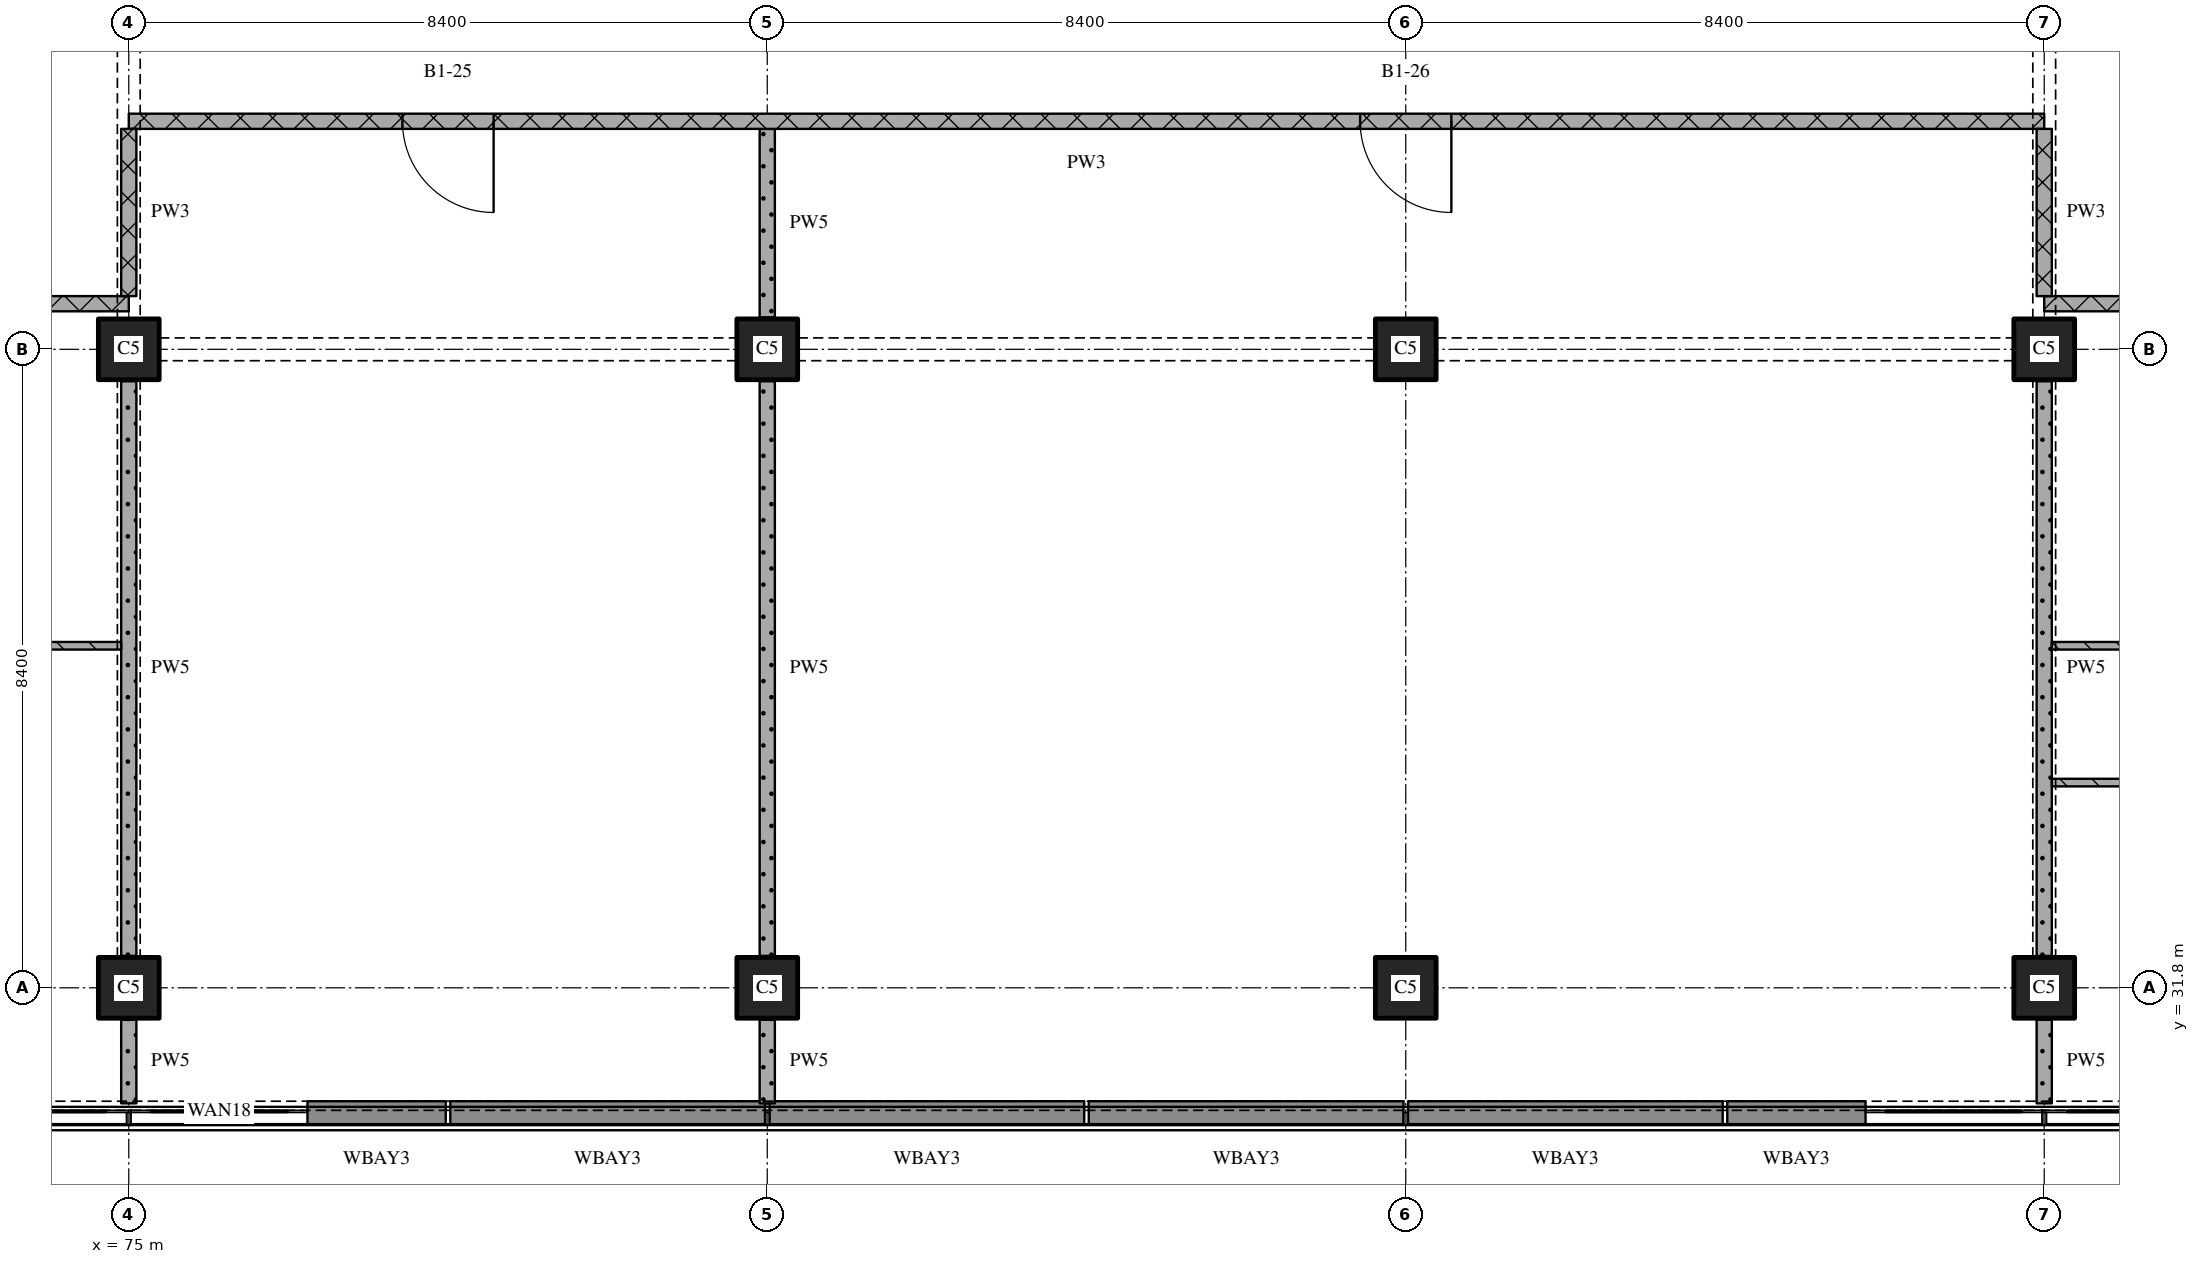
"""IFC4 building model, lengths in metres.
Left out: names, types, materials, properties, quantities, classifications, styles, units other than length and angle.
Written with IfcOpenShell. Run it as: python <this file> out.ifc"""

import sys

from ifc_helpers import new_model, si_unit, direction, frame, frame_2d, origin, origin_2d, place, context, subcontext, project, spatial, rectangle, extrude, element, fill, save


model = new_model("IFC4")
c1 = context("Model", 3, precision=1e-05, world=origin(), true_north=direction((0.0, 1.0)))
c2 = subcontext(c1, "Body", "Model", "MODEL_VIEW")
j1 = project(units=[si_unit("LENGTHUNIT", "METRE"), si_unit("PLANEANGLEUNIT", "RADIAN")], contexts=[c1])
p1 = place(None, origin())
s1 = spatial("IfcSite", under=j1, at=p1, CompositionType="ELEMENT")
p2 = place(p1, origin())
s2 = spatial("IfcBuilding", under=s1, at=p2, CompositionType="ELEMENT")
p3 = place(p2, frame((0.0, 0.0, 95.25)))
s3 = spatial("IfcBuildingStorey", under=s2, at=p3, CompositionType="ELEMENT", Elevation=95.25)
for number, where, z_axis, x_axis in (
    (1, (75.0, 31.8, 0.0), (0.0, 0.0, 1.0), (1.0, 0.0, 0.0)),
    (2, (75.0, 40.2, 0.0), (0.0, 0.0, 1.0), (1.0, 0.0, 0.0)),
    (3, (83.4, 31.8, 0.0), (0.0, 0.0, 1.0), (1.0, 0.0, 0.0)),
    (4, (83.4, 40.2, 0.0), (0.0, 0.0, 1.0), (1.0, 0.0, 0.0)),
    (5, (91.8, 31.8, 0.0), (0.0, 0.0, 1.0), (1.0, 0.0, 0.0)),
    (6, (91.8, 40.2, 0.0), (0.0, 0.0, 1.0), (1.0, 0.0, 0.0)),
    (7, (100.2, 31.8, 0.0), (0.0, 0.0, 1.0), (1.0, 0.0, 0.0)),
    (8, (100.2, 40.2, 0.0), (0.0, 0.0, 1.0), (1.0, 0.0, 0.0)),
):
    element("IfcColumn", number, at=place(p3, frame(where, z_axis=z_axis, x_axis=x_axis)), inside=s3, PredefinedType="COLUMN", context=c2, shape_type="SweptSolid", body=[
        extrude(rectangle(XDim=0.8, YDim=0.8, at=origin_2d()), origin(), (0.0, 0.0, 1.0), 3.6),
    ])
p4 = place(p3, frame((79.17, 30.154, 0.0), z_axis=(0.0, 0.0, 1.0), x_axis=(-1.0, 0.0, 0.0)))
e9 = element("IfcWall", 9, at=p4, inside=s3, PredefinedType="SOLIDWALL", context=c2, shape_type="SweptSolid", body=[
    extrude(rectangle(XDim=1.819, YDim=0.308, at=frame_2d((0.91, 0.0))), origin(), (0.0, 0.0, 1.0), 3.2),
])
for number, where, z_axis, x_axis in (
    (10, (83.37, 30.154, 0.0), (0.0, 0.0, 1.0), (-1.0, 0.0, 0.0)),
    (11, (87.57, 30.154, 0.0), (0.0, 0.0, 1.0), (-1.0, 0.0, 0.0)),
    (12, (91.77, 30.154, 0.0), (0.0, 0.0, 1.0), (-1.0, 0.0, 0.0)),
):
    element("IfcWall", number, at=place(p3, frame(where, z_axis=z_axis, x_axis=x_axis)), inside=s3, PredefinedType="SOLIDWALL", context=c2, shape_type="SweptSolid", body=[
        extrude(rectangle(XDim=4.14, YDim=0.308, at=frame_2d((2.07, 0.0))), origin(), (0.0, 0.0, 1.0), 3.2),
    ])
p5 = place(p3, frame((95.97, 30.154, 0.0), z_axis=(0.0, 0.0, 1.0), x_axis=(-1.0, 0.0, 0.0)))
e13 = element("IfcWall", 13, at=p5, inside=s3, PredefinedType="SOLIDWALL", context=c2, shape_type="SweptSolid", body=[
    extrude(rectangle(XDim=4.14, YDim=0.308, at=frame_2d((2.07, 0.0))), origin(), (0.0, 0.0, 1.0), 3.2),
])
p6 = place(p3, frame((97.849, 30.154, 0.0), z_axis=(0.0, 0.0, 1.0), x_axis=(-1.0, 0.0, 0.0)))
e14 = element("IfcWall", 14, at=p6, inside=s3, PredefinedType="SOLIDWALL", context=c2, shape_type="SweptSolid", body=[
    extrude(rectangle(XDim=1.819, YDim=0.308, at=frame_2d((0.91, 0.0))), origin(), (0.0, 0.0, 1.0), 3.2),
])
p7 = place(p3, frame((117.0, 34.5, 0.0), z_axis=(0.0, 0.0, 1.0), x_axis=(-1.0, 0.0, 0.0)))
e15 = element("IfcWall", 15, at=p7, inside=s3, PredefinedType="PARTITIONING", context=c2, shape_type="SweptSolid", body=[
    extrude(rectangle(XDim=16.7, YDim=0.1, at=frame_2d((8.35, 0.0))), origin(), (0.0, 0.0, 1.0), 3.32),
])
p8 = place(p7, frame((12.15, 0.0, 0.0)))
e16 = element("IfcOpeningElement", 16, at=p8, cuts=e15, PredefinedType="OPENING", context=c2, shape_type="SweptSolid", body=[
    extrude(rectangle(XDim=0.9, YDim=2.1, at=frame_2d((0.45, 1.05))), frame((0.0, 0.06, 0.0), z_axis=(0.0, -1.0, 0.0), x_axis=(1.0, 0.0, 0.0)), (0.0, 0.0, 1.0), 0.12),
])
p9 = place(p3, frame((65.7, 36.3, 0.0), z_axis=(0.0, 0.0, 1.0), x_axis=(1.0, 0.0, 0.0)))
e17 = element("IfcWall", 17, at=p9, inside=s3, PredefinedType="PARTITIONING", context=c2, shape_type="SweptSolid", body=[
    extrude(rectangle(XDim=9.2, YDim=0.1, at=frame_2d((4.6, 0.0))), origin(), (0.0, 0.0, 1.0), 3.32),
])
p10 = place(p9, frame((6.5, 0.0, 0.0)))
e18 = element("IfcOpeningElement", 18, at=p10, cuts=e17, PredefinedType="OPENING", context=c2, shape_type="SweptSolid", body=[
    extrude(rectangle(XDim=0.8, YDim=2.1, at=frame_2d((0.4, 1.05))), frame((0.0, 0.06, 0.0), z_axis=(0.0, -1.0, 0.0), x_axis=(1.0, 0.0, 0.0)), (0.0, 0.0, 1.0), 0.12),
])
p11 = place(p3, frame((100.3, 36.3, 0.0), z_axis=(0.0, 0.0, 1.0), x_axis=(1.0, 0.0, 0.0)))
e19 = element("IfcWall", 19, at=p11, inside=s3, PredefinedType="PARTITIONING", context=c2, shape_type="SweptSolid", body=[
    extrude(rectangle(XDim=9.2, YDim=0.1, at=frame_2d((4.6, 0.0))), origin(), (0.0, 0.0, 1.0), 3.32),
])
p12 = place(p11, frame((1.75, 0.0, 0.0)))
e20 = element("IfcOpeningElement", 20, at=p12, cuts=e19, PredefinedType="OPENING", context=c2, shape_type="SweptSolid", body=[
    extrude(rectangle(XDim=0.8, YDim=2.1, at=frame_2d((0.4, 1.05))), frame((0.0, 0.06, 0.0), z_axis=(0.0, -1.0, 0.0), x_axis=(1.0, 0.0, 0.0)), (0.0, 0.0, 1.0), 0.12),
])
p13 = place(p3, frame((75.0, 40.8, 0.0), z_axis=(0.0, 0.0, 1.0), x_axis=(-1.0, 0.0, 0.0)))
e21 = element("IfcWall", 21, at=p13, inside=s3, PredefinedType="PARTITIONING", context=c2, shape_type="SweptSolid", body=[
    extrude(rectangle(XDim=24.18, YDim=0.2, at=frame_2d((12.09, 0.0))), origin(), (0.0, 0.0, 1.0), 3.32),
])
p14 = place(p13, frame((9.55, 0.0, 0.0)))
e22 = element("IfcOpeningElement", 22, at=p14, cuts=e21, PredefinedType="OPENING", context=c2, shape_type="SweptSolid", body=[
    extrude(rectangle(XDim=1.0, YDim=2.1, at=frame_2d((0.5, 1.05))), frame((0.0, 0.11, 0.0), z_axis=(0.0, -1.0, 0.0), x_axis=(1.0, 0.0, 0.0)), (0.0, 0.0, 1.0), 0.22),
])
p15 = place(p3, frame((124.38, 40.8, 0.0), z_axis=(0.0, 0.0, 1.0), x_axis=(-1.0, 0.0, 0.0)))
e23 = element("IfcWall", 23, at=p15, inside=s3, PredefinedType="PARTITIONING", context=c2, shape_type="SweptSolid", body=[
    extrude(rectangle(XDim=24.18, YDim=0.2, at=frame_2d((12.09, 0.0))), origin(), (0.0, 0.0, 1.0), 3.32),
])
p16 = place(p15, frame((13.63, 0.0, 0.0)))
e24 = element("IfcOpeningElement", 24, at=p16, cuts=e23, PredefinedType="OPENING", context=c2, shape_type="SweptSolid", body=[
    extrude(rectangle(XDim=1.0, YDim=2.1, at=frame_2d((0.5, 1.05))), frame((0.0, 0.11, 0.0), z_axis=(0.0, -1.0, 0.0), x_axis=(1.0, 0.0, 0.0)), (0.0, 0.0, 1.0), 0.22),
])
p17 = place(p3, frame((100.2, 43.2, 0.0), z_axis=(0.0, 0.0, 1.0), x_axis=(-1.0, 0.0, 0.0)))
e25 = element("IfcWall", 25, at=p17, inside=s3, PredefinedType="PARTITIONING", context=c2, shape_type="SweptSolid", body=[
    extrude(rectangle(XDim=25.2, YDim=0.2, at=frame_2d((12.6, 0.0))), origin(), (0.0, 0.0, 1.0), 3.32),
])
p18 = place(p17, frame((7.8, 0.0, 0.0)))
e26 = element("IfcOpeningElement", 26, at=p18, cuts=e25, PredefinedType="OPENING", context=c2, shape_type="SweptSolid", body=[
    extrude(rectangle(XDim=1.2, YDim=2.1, at=frame_2d((0.6, 1.05))), frame((0.0, 0.11, 0.0), z_axis=(0.0, -1.0, 0.0), x_axis=(1.0, 0.0, 0.0)), (0.0, 0.0, 1.0), 0.22),
])
p19 = place(p17, frame((20.4, 0.0, 0.0)))
e27 = element("IfcOpeningElement", 27, at=p19, cuts=e25, PredefinedType="OPENING", context=c2, shape_type="SweptSolid", body=[
    extrude(rectangle(XDim=1.2, YDim=2.1, at=frame_2d((0.6, 1.05))), frame((0.0, 0.11, 0.0), z_axis=(0.0, -1.0, 0.0), x_axis=(1.0, 0.0, 0.0)), (0.0, 0.0, 1.0), 0.22),
])
p20 = place(p3, frame((75.0, 43.1, 0.0), z_axis=(0.0, 0.0, 1.0), x_axis=(0.0, -1.0, 0.0)))
e28 = element("IfcWall", 28, at=p20, inside=s3, PredefinedType="PARTITIONING", context=c2, shape_type="SweptSolid", body=[
    extrude(rectangle(XDim=2.2, YDim=0.2, at=frame_2d((1.1, 0.0))), origin(), (0.0, 0.0, 1.0), 2.43),
])
p21 = place(p3, frame((75.0, 31.38, 0.0), z_axis=(0.0, 0.0, 1.0), x_axis=(0.0, -1.0, 0.0)))
e29 = element("IfcWall", 29, at=p21, inside=s3, PredefinedType="PARTITIONING", context=c2, shape_type="SweptSolid", body=[
    extrude(rectangle(XDim=1.1, YDim=0.2, at=frame_2d((0.55, 0.0))), origin(), (0.0, 0.0, 1.0), 3.32),
])
p22 = place(p3, frame((75.0, 39.78, 0.0), z_axis=(0.0, 0.0, 1.0), x_axis=(0.0, -1.0, 0.0)))
e30 = element("IfcWall", 30, at=p22, inside=s3, PredefinedType="PARTITIONING", context=c2, shape_type="SweptSolid", body=[
    extrude(rectangle(XDim=7.56, YDim=0.2, at=frame_2d((3.78, 0.0))), origin(), (0.0, 0.0, 1.0), 2.83),
])
p23 = place(p3, frame((83.4, 31.38, 0.0), z_axis=(0.0, 0.0, 1.0), x_axis=(0.0, -1.0, 0.0)))
e31 = element("IfcWall", 31, at=p23, inside=s3, PredefinedType="PARTITIONING", context=c2, shape_type="SweptSolid", body=[
    extrude(rectangle(XDim=1.1, YDim=0.2, at=frame_2d((0.55, 0.0))), origin(), (0.0, 0.0, 1.0), 3.32),
])
p24 = place(p3, frame((83.4, 39.78, 0.0), z_axis=(0.0, 0.0, 1.0), x_axis=(0.0, -1.0, 0.0)))
e32 = element("IfcWall", 32, at=p24, inside=s3, PredefinedType="PARTITIONING", context=c2, shape_type="SweptSolid", body=[
    extrude(rectangle(XDim=7.56, YDim=0.2, at=frame_2d((3.78, 0.0))), origin(), (0.0, 0.0, 1.0), 3.32),
])
p25 = place(p3, frame((83.4, 43.1, 0.0), z_axis=(0.0, 0.0, 1.0), x_axis=(0.0, -1.0, 0.0)))
e33 = element("IfcWall", 33, at=p25, inside=s3, PredefinedType="PARTITIONING", context=c2, shape_type="SweptSolid", body=[
    extrude(rectangle(XDim=2.48, YDim=0.2, at=frame_2d((1.24, 0.0))), origin(), (0.0, 0.0, 1.0), 3.32),
])
p26 = place(p3, frame((100.2, 43.1, 0.0), z_axis=(0.0, 0.0, 1.0), x_axis=(0.0, -1.0, 0.0)))
e34 = element("IfcWall", 34, at=p26, inside=s3, PredefinedType="PARTITIONING", context=c2, shape_type="SweptSolid", body=[
    extrude(rectangle(XDim=2.2, YDim=0.2, at=frame_2d((1.1, 0.0))), origin(), (0.0, 0.0, 1.0), 2.43),
])
p27 = place(p3, frame((100.2, 31.38, 0.0), z_axis=(0.0, 0.0, 1.0), x_axis=(0.0, -1.0, 0.0)))
e35 = element("IfcWall", 35, at=p27, inside=s3, PredefinedType="PARTITIONING", context=c2, shape_type="SweptSolid", body=[
    extrude(rectangle(XDim=1.1, YDim=0.2, at=frame_2d((0.55, 0.0))), origin(), (0.0, 0.0, 1.0), 3.32),
])
p28 = place(p3, frame((100.2, 39.78, 0.0), z_axis=(0.0, 0.0, 1.0), x_axis=(0.0, -1.0, 0.0)))
e36 = element("IfcWall", 36, at=p28, inside=s3, PredefinedType="PARTITIONING", context=c2, shape_type="SweptSolid", body=[
    extrude(rectangle(XDim=7.56, YDim=0.2, at=frame_2d((3.78, 0.0))), origin(), (0.0, 0.0, 1.0), 2.83),
])
p29 = place(p18, origin())
e37 = element("IfcDoor", 37, at=p29, inside=s3, OperationType="SINGLE_SWING_LEFT", PredefinedType="DOOR", context=c2, shape_type="SweptSolid", body=[
    extrude(rectangle(XDim=1.2, YDim=2.1, at=frame_2d((0.6, 1.05))), frame((0.0, 0.025, 0.0), z_axis=(0.0, -1.0, 0.0), x_axis=(1.0, 0.0, 0.0)), (0.0, 0.0, 1.0), 0.05),
])
fill(e26, e37)
p30 = place(p19, origin())
e38 = element("IfcDoor", 38, at=p30, inside=s3, OperationType="SINGLE_SWING_LEFT", PredefinedType="DOOR", context=c2, shape_type="SweptSolid", body=[
    extrude(rectangle(XDim=1.2, YDim=2.1, at=frame_2d((0.6, 1.05))), frame((0.0, 0.025, 0.0), z_axis=(0.0, -1.0, 0.0), x_axis=(1.0, 0.0, 0.0)), (0.0, 0.0, 1.0), 0.05),
])
fill(e27, e38)
save(model, sys.argv[1])
